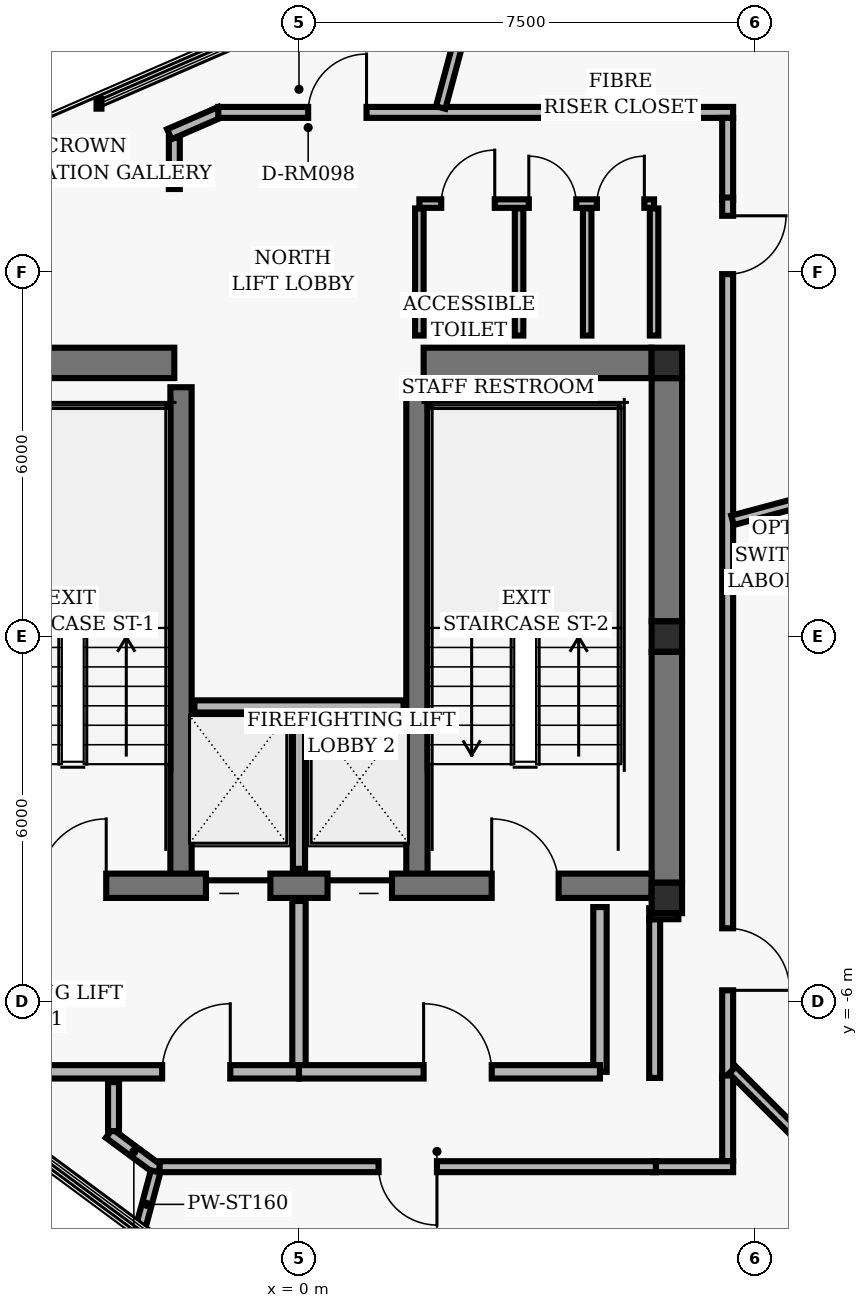
"""IFC4 building model, lengths in metres.
Left out: names, types, materials, properties, quantities, classifications, styles, units other than length and angle.
Written with IfcOpenShell. Run it as: python <this file> out.ifc"""

import sys

from ifc_helpers import new_model, si_unit, direction, frame, frame_2d, origin, origin_2d, place, context, subcontext, project, spatial, rectangle, hollow_rectangle, extrude, element, fill, save


model = new_model("IFC4")
c1 = context("Model", 3, precision=1e-05, world=origin(), true_north=direction((0.0, 1.0)))
c2 = subcontext(c1, "Body", "Model", "MODEL_VIEW")
j1 = project(units=[si_unit("LENGTHUNIT", "METRE"), si_unit("PLANEANGLEUNIT", "RADIAN")], contexts=[c1])
p1 = place(None, origin())
s1 = spatial("IfcSite", under=j1, at=p1, CompositionType="ELEMENT")
p2 = place(p1, origin())
s2 = spatial("IfcBuilding", under=s1, at=p2, CompositionType="ELEMENT")
p3 = place(p2, frame((0.0, 0.0, 246.24)))
s3 = spatial("IfcBuildingStorey", under=s2, at=p3, CompositionType="ELEMENT", Elevation=246.24)
for number, where, z_axis, x_axis in (
    (1, (6.05, 4.5, 0.0), (0.0, 0.0, 1.0), (1.0, 0.0, 0.0)),
    (2, (6.05, 0.0, 0.0), (0.0, 0.0, 1.0), (1.0, 0.0, 0.0)),
    (3, (6.05, -4.3, 0.0), (0.0, 0.0, 1.0), (1.0, 0.0, 0.0)),
):
    element("IfcColumn", number, at=place(p3, frame(where, z_axis=z_axis, x_axis=x_axis)), inside=s3, PredefinedType="COLUMN", context=c2, shape_type="SweptSolid", body=[
        extrude(hollow_rectangle(XDim=0.5, YDim=0.5, WallThickness=0.02, InnerFilletRadius=0.02, OuterFilletRadius=0.04, at=origin_2d()), origin(), (0.0, 0.0, 1.0), 2.88),
    ])
p4 = place(p3, frame((6.05, 0.25, 0.0), z_axis=(0.0, 0.0, 1.0), x_axis=(0.0, 1.0, 0.0)))
e4 = element("IfcWall", 4, at=p4, inside=s3, PredefinedType="SHEAR", context=c2, shape_type="SweptSolid", body=[
    extrude(rectangle(XDim=4.0, YDim=0.5, at=frame_2d((2.0, 0.0))), origin(), (0.0, 0.0, 1.0), 2.648),
])
p5 = place(p3, frame((6.05, -4.05, 0.0), z_axis=(0.0, 0.0, 1.0), x_axis=(0.0, 1.0, 0.0)))
e5 = element("IfcWall", 5, at=p5, inside=s3, PredefinedType="SHEAR", context=c2, shape_type="SweptSolid", body=[
    extrude(rectangle(XDim=3.8, YDim=0.5, at=frame_2d((1.9, 0.0))), origin(), (0.0, 0.0, 1.0), 2.648),
])
for number, where, z_axis, x_axis in (
    (6, (-1.94, -4.1, 0.0), (0.0, 0.0, 1.0), (0.0, 1.0, 0.0)),
    (7, (1.94, -4.1, 0.0), (0.0, 0.0, 1.0), (0.0, 1.0, 0.0)),
):
    element("IfcWall", number, at=place(p3, frame(where, z_axis=z_axis, x_axis=x_axis)), inside=s3, PredefinedType="SHEAR", context=c2, shape_type="SweptSolid", body=[
        extrude(rectangle(XDim=8.2, YDim=0.35, at=frame_2d((4.1, 0.0))), origin(), (0.0, 0.0, 1.0), 2.648),
    ])
p6 = place(p3, frame((-5.8, -4.1, 0.0), z_axis=(0.0, 0.0, 1.0), x_axis=(1.0, 0.0, 0.0)))
e8 = element("IfcWall", 8, at=p6, inside=s3, PredefinedType="SHEAR", context=c2, shape_type="SweptSolid", body=[
    extrude(rectangle(XDim=11.6, YDim=0.4, at=frame_2d((5.8, 0.0))), origin(), (0.0, 0.0, 1.0), 2.648),
])
p7 = place(p6, frame((1.53, 0.0, 0.0)))
e9 = element("IfcOpeningElement", 9, at=p7, cuts=e8, PredefinedType="OPENING", context=c2, shape_type="SweptSolid", body=[
    extrude(rectangle(XDim=1.1, YDim=2.04, at=frame_2d((0.55, 1.02))), frame((0.0, 0.21, 0.0), z_axis=(0.0, -1.0, 0.0), x_axis=(1.0, 0.0, 0.0)), (0.0, 0.0, 1.0), 0.42),
])
p8 = place(p6, frame((8.97, 0.0, 0.0)))
e10 = element("IfcOpeningElement", 10, at=p8, cuts=e8, PredefinedType="OPENING", context=c2, shape_type="SweptSolid", body=[
    extrude(rectangle(XDim=1.1, YDim=2.04, at=frame_2d((0.55, 1.02))), frame((0.0, 0.21, 0.0), z_axis=(0.0, -1.0, 0.0), x_axis=(1.0, 0.0, 0.0)), (0.0, 0.0, 1.0), 0.42),
])
p9 = place(p6, frame((4.27, 0.0, 0.0)))
e11 = element("IfcOpeningElement", 11, at=p9, cuts=e8, PredefinedType="OPENING", context=c2, shape_type="SweptSolid", body=[
    extrude(rectangle(XDim=1.06, YDim=2.04, at=frame_2d((0.53, 1.02))), frame((0.0, 0.21, 0.0), z_axis=(0.0, -1.0, 0.0), x_axis=(1.0, 0.0, 0.0)), (0.0, 0.0, 1.0), 0.42),
])
p10 = place(p6, frame((6.27, 0.0, 0.0)))
e12 = element("IfcOpeningElement", 12, at=p10, cuts=e8, PredefinedType="OPENING", context=c2, shape_type="SweptSolid", body=[
    extrude(rectangle(XDim=1.06, YDim=2.04, at=frame_2d((0.53, 1.02))), frame((0.0, 0.21, 0.0), z_axis=(0.0, -1.0, 0.0), x_axis=(1.0, 0.0, 0.0)), (0.0, 0.0, 1.0), 0.42),
])
for number, where, z_axis, x_axis in (
    (13, (-5.8, 4.5, 0.0), (0.0, 0.0, 1.0), (1.0, 0.0, 0.0)),
    (14, (2.05, 4.5, 0.0), (0.0, 0.0, 1.0), (1.0, 0.0, 0.0)),
):
    element("IfcWall", number, at=place(p3, frame(where, z_axis=z_axis, x_axis=x_axis)), inside=s3, PredefinedType="SHEAR", context=c2, shape_type="SweptSolid", body=[
        extrude(rectangle(XDim=3.75, YDim=0.5, at=frame_2d((1.875, 0.0))), origin(), (0.0, 0.0, 1.0), 2.648),
    ])
p11 = place(p3, frame((0.0, -3.82, 0.0), z_axis=(0.0, 0.0, 1.0), x_axis=(0.0, 1.0, 0.0)))
e15 = element("IfcWall", 15, at=p11, inside=s3, PredefinedType="PARTITIONING", context=c2, shape_type="SweptSolid", body=[
    extrude(rectangle(XDim=2.67, YDim=0.2, at=frame_2d((1.335, 0.0))), origin(), (0.0, 0.0, 1.0), 2.623),
])
p12 = place(p3, frame((-1.72, -1.15, 0.0), z_axis=(0.0, 0.0, 1.0), x_axis=(1.0, 0.0, 0.0)))
e16 = element("IfcWall", 16, at=p12, inside=s3, PredefinedType="PARTITIONING", context=c2, shape_type="SweptSolid", body=[
    extrude(rectangle(XDim=3.44, YDim=0.2, at=frame_2d((1.72, 0.0))), origin(), (0.0, 0.0, 1.0), 2.623),
])
p13 = place(p3, frame((4.95, -7.16, 0.0), z_axis=(0.0, 0.0, 1.0), x_axis=(0.0, 1.0, 0.0)))
e17 = element("IfcWall", 17, at=p13, inside=s3, PredefinedType="PARTITIONING", context=c2, shape_type="SweptSolid", body=[
    extrude(rectangle(XDim=2.71, YDim=0.22, at=frame_2d((1.355, 0.0))), origin(), (0.0, 0.0, 1.0), 2.623),
])
p14 = place(p3, frame((0.0, -7.16, 0.0), z_axis=(0.0, 0.0, 1.0), x_axis=(0.0, 1.0, 0.0)))
e18 = element("IfcWall", 18, at=p14, inside=s3, PredefinedType="PARTITIONING", context=c2, shape_type="SweptSolid", body=[
    extrude(rectangle(XDim=2.81, YDim=0.22, at=frame_2d((1.405, 0.0))), origin(), (0.0, 0.0, 1.0), 2.623),
])
p15 = place(p3, frame((-5.4, -7.16, 0.0), z_axis=(0.0, 0.0, 1.0), x_axis=(1.0, 0.0, 0.0)))
e19 = element("IfcWall", 19, at=p15, inside=s3, PredefinedType="PARTITIONING", context=c2, shape_type="SweptSolid", body=[
    extrude(rectangle(XDim=5.4, YDim=0.22, at=frame_2d((2.7, 0.0))), origin(), (0.0, 0.0, 1.0), 2.623),
])
p16 = place(p15, frame((3.15, 0.0, 0.0)))
e20 = element("IfcOpeningElement", 20, at=p16, cuts=e19, PredefinedType="OPENING", context=c2, shape_type="SweptSolid", body=[
    extrude(rectangle(XDim=1.12, YDim=2.02, at=frame_2d((0.56, 1.01))), frame((0.0, 0.12, 0.0), z_axis=(0.0, -1.0, 0.0), x_axis=(1.0, 0.0, 0.0)), (0.0, 0.0, 1.0), 0.24),
])
p17 = place(p3, frame((0.0, -7.16, 0.0), z_axis=(0.0, 0.0, 1.0), x_axis=(1.0, 0.0, 0.0)))
e21 = element("IfcWall", 21, at=p17, inside=s3, PredefinedType="PARTITIONING", context=c2, shape_type="SweptSolid", body=[
    extrude(rectangle(XDim=4.95, YDim=0.22, at=frame_2d((2.475, 0.0))), origin(), (0.0, 0.0, 1.0), 2.623),
])
p18 = place(p17, frame((2.05, 0.0, 0.0)))
e22 = element("IfcOpeningElement", 22, at=p18, cuts=e21, PredefinedType="OPENING", context=c2, shape_type="SweptSolid", body=[
    extrude(rectangle(XDim=1.12, YDim=2.02, at=frame_2d((0.56, 1.01))), frame((0.0, 0.12, 0.0), z_axis=(0.0, -1.0, 0.0), x_axis=(1.0, 0.0, 0.0)), (0.0, 0.0, 1.0), 0.24),
])
p19 = place(p3, frame((1.98, 4.95, 0.0), z_axis=(0.0, 0.0, 1.0), x_axis=(0.0, 1.0, 0.0)))
e23 = element("IfcWall", 23, at=p19, inside=s3, PredefinedType="PARTITIONING", context=c2, shape_type="SweptSolid", body=[
    extrude(rectangle(XDim=2.09, YDim=0.14, at=frame_2d((1.045, 0.0))), origin(), (0.0, 0.0, 1.0), 2.623),
])
p20 = place(p3, frame((5.84, 4.95, 0.0), z_axis=(0.0, 0.0, 1.0), x_axis=(0.0, 1.0, 0.0)))
e24 = element("IfcWall", 24, at=p20, inside=s3, PredefinedType="PARTITIONING", context=c2, shape_type="SweptSolid", body=[
    extrude(rectangle(XDim=2.09, YDim=0.14, at=frame_2d((1.045, 0.0))), origin(), (0.0, 0.0, 1.0), 2.153),
])
p21 = place(p3, frame((1.98, 7.12, 0.0), z_axis=(0.0, 0.0, 1.0), x_axis=(1.0, 0.0, 0.0)))
e25 = element("IfcWall", 25, at=p21, inside=s3, PredefinedType="PARTITIONING", context=c2, shape_type="SweptSolid", body=[
    extrude(rectangle(XDim=3.86, YDim=0.14, at=frame_2d((1.93, 0.0))), origin(), (0.0, 0.0, 1.0), 2.623),
])
p22 = place(p21, frame((0.36, 0.0, 0.0)))
e26 = element("IfcOpeningElement", 26, at=p22, cuts=e25, PredefinedType="OPENING", context=c2, shape_type="SweptSolid", body=[
    extrude(rectangle(XDim=0.88, YDim=2.02, at=frame_2d((0.44, 1.01))), frame((0.0, 0.08, 0.0), z_axis=(0.0, -1.0, 0.0), x_axis=(1.0, 0.0, 0.0)), (0.0, 0.0, 1.0), 0.16),
])
p23 = place(p21, frame((1.8, 0.0, 0.0)))
e27 = element("IfcOpeningElement", 27, at=p23, cuts=e25, PredefinedType="OPENING", context=c2, shape_type="SweptSolid", body=[
    extrude(rectangle(XDim=0.78, YDim=2.01, at=frame_2d((0.39, 1.005))), frame((0.0, 0.08, 0.0), z_axis=(0.0, -1.0, 0.0), x_axis=(1.0, 0.0, 0.0)), (0.0, 0.0, 1.0), 0.16),
])
p24 = place(p21, frame((2.92, 0.0, 0.0)))
e28 = element("IfcOpeningElement", 28, at=p24, cuts=e25, PredefinedType="OPENING", context=c2, shape_type="SweptSolid", body=[
    extrude(rectangle(XDim=0.78, YDim=2.01, at=frame_2d((0.39, 1.005))), frame((0.0, 0.08, 0.0), z_axis=(0.0, -1.0, 0.0), x_axis=(1.0, 0.0, 0.0)), (0.0, 0.0, 1.0), 0.16),
])
for number, where, z_axis, x_axis in (
    (29, (3.62, 4.95, 0.0), (0.0, 0.0, 1.0), (0.0, 1.0, 0.0)),
    (30, (4.74, 4.95, 0.0), (0.0, 0.0, 1.0), (0.0, 1.0, 0.0)),
):
    element("IfcWall", number, at=place(p3, frame(where, z_axis=z_axis, x_axis=x_axis)), inside=s3, PredefinedType="PARTITIONING", context=c2, shape_type="SweptSolid", body=[
        extrude(rectangle(XDim=2.09, YDim=0.14, at=frame_2d((1.045, 0.0))), origin(), (0.0, 0.0, 1.0), 2.623),
    ])
p25 = place(p3, frame((-2.309, -8.773, 0.0), z_axis=(0.0, 0.0, 1.0), x_axis=(-0.803864984235, 0.594811808155, 0.0)))
e31 = element("IfcWall", 31, at=p25, inside=s3, PredefinedType="PARTITIONING", context=c2, shape_type="SweptSolid", body=[
    extrude(rectangle(XDim=1.011, YDim=0.18, at=frame_2d((0.506, 0.0))), origin(), (0.0, 0.0, 1.0), 2.203),
])
p26 = place(p3, frame((-3.05, -8.135, 0.0), z_axis=(0.0, 0.0, 1.0), x_axis=(0.0, 1.0, 0.0)))
e32 = element("IfcWall", 32, at=p26, inside=s3, PredefinedType="PARTITIONING", context=c2, shape_type="SweptSolid", body=[
    extrude(rectangle(XDim=0.805, YDim=0.18, at=frame_2d((0.403, 0.0))), origin(), (0.0, 0.0, 1.0), 2.623),
])
p27 = place(p3, frame((5.85, -7.26, 0.0), z_axis=(0.0, 0.0, 1.0), x_axis=(0.0, 1.0, 0.0)))
e33 = element("IfcWall", 33, at=p27, inside=s3, PredefinedType="PARTITIONING", context=c2, shape_type="SweptSolid", body=[
    extrude(rectangle(XDim=2.61, YDim=0.18, at=frame_2d((1.305, 0.0))), origin(), (0.0, 0.0, 1.0), 2.153),
])
p28 = place(p3, frame((5.76, -4.56, 0.0), z_axis=(0.0, 0.0, 1.0), x_axis=(1.0, 0.0, 0.0)))
e34 = element("IfcWall", 34, at=p28, inside=s3, PredefinedType="PARTITIONING", context=c2, shape_type="SweptSolid", body=[
    extrude(rectangle(XDim=0.48, YDim=0.18, at=frame_2d((0.24, 0.0))), origin(), (0.0, 0.0, 1.0), 2.623),
])
p29 = place(p3, frame((-2.05, 7.36, 0.0), z_axis=(0.0, 0.0, 1.0), x_axis=(0.0, 1.0, 0.0)))
e35 = element("IfcWall", 35, at=p29, inside=s3, PredefinedType="PARTITIONING", context=c2, shape_type="SweptSolid", body=[
    extrude(rectangle(XDim=0.847, YDim=0.18, at=frame_2d((0.423, 0.0))), origin(), (0.0, 0.0, 1.0), 2.623),
])
p30 = place(p3, frame((-2.133, 8.261, 0.0), z_axis=(0.0, 0.0, 1.0), x_axis=(0.917032085412, 0.398813432979, 0.0)))
e36 = element("IfcWall", 36, at=p30, inside=s3, PredefinedType="PARTITIONING", context=c2, shape_type="SweptSolid", body=[
    extrude(rectangle(XDim=0.92, YDim=0.18, at=frame_2d((0.46, 0.0))), origin(), (0.0, 0.0, 1.0), 2.203),
])
p31 = place(p3, frame((-1.327, 8.62, 0.0), z_axis=(0.0, 0.0, 1.0), x_axis=(1.0, 0.0, 0.0)))
e37 = element("IfcWall", 37, at=p31, inside=s3, PredefinedType="PARTITIONING", context=c2, shape_type="SweptSolid", body=[
    extrude(rectangle(XDim=7.197, YDim=0.18, at=frame_2d((3.599, 0.0))), origin(), (0.0, 0.0, 1.0), 2.623),
])
p32 = place(p31, frame((1.478, 0.0, 0.0)))
e38 = element("IfcOpeningElement", 38, at=p32, cuts=e37, PredefinedType="OPENING", context=c2, shape_type="SweptSolid", body=[
    extrude(rectangle(XDim=0.96, YDim=2.02, at=frame_2d((0.48, 1.01))), frame((0.0, 0.1, 0.0), z_axis=(0.0, -1.0, 0.0), x_axis=(1.0, 0.0, 0.0)), (0.0, 0.0, 1.0), 0.2),
])
p33 = place(p3, frame((5.83, 8.62, 0.0), z_axis=(0.0, 0.0, 1.0), x_axis=(1.0, 0.0, 0.0)))
e39 = element("IfcWall", 39, at=p33, inside=s3, PredefinedType="PARTITIONING", context=c2, shape_type="SweptSolid", body=[
    extrude(rectangle(XDim=1.31, YDim=0.18, at=frame_2d((0.655, 0.0))), origin(), (0.0, 0.0, 1.0), 2.623),
])
p34 = place(p3, frame((7.05, 8.53, 0.0), z_axis=(0.0, 0.0, 1.0), x_axis=(0.0, -1.0, 0.0)))
e40 = element("IfcWall", 40, at=p34, inside=s3, PredefinedType="PARTITIONING", context=c2, shape_type="SweptSolid", body=[
    extrude(rectangle(XDim=1.35, YDim=0.18, at=frame_2d((0.675, 0.0))), origin(), (0.0, 0.0, 1.0), 2.623),
])
p35 = place(p3, frame((7.05, 7.22, 0.0), z_axis=(0.0, 0.0, 1.0), x_axis=(0.0, -1.0, 0.0)))
e41 = element("IfcWall", 41, at=p35, inside=s3, PredefinedType="PARTITIONING", context=c2, shape_type="SweptSolid", body=[
    extrude(rectangle(XDim=14.48, YDim=0.18, at=frame_2d((7.24, 0.0))), origin(), (0.0, 0.0, 1.0), 2.203),
])
p36 = place(p35, frame((12.019, 0.0, 0.0)))
e42 = element("IfcOpeningElement", 42, at=p36, cuts=e41, PredefinedType="OPENING", context=c2, shape_type="SweptSolid", body=[
    extrude(rectangle(XDim=1.02, YDim=2.02, at=frame_2d((0.51, 1.01))), frame((0.0, 0.1, 0.0), z_axis=(0.0, -1.0, 0.0), x_axis=(1.0, 0.0, 0.0)), (0.0, 0.0, 1.0), 0.2),
])
p37 = place(p35, frame((0.3, 0.0, 0.0)))
e43 = element("IfcOpeningElement", 43, at=p37, cuts=e41, PredefinedType="OPENING", context=c2, shape_type="SweptSolid", body=[
    extrude(rectangle(XDim=0.96, YDim=2.02, at=frame_2d((0.48, 1.01))), frame((0.0, 0.1, 0.0), z_axis=(0.0, -1.0, 0.0), x_axis=(1.0, 0.0, 0.0)), (0.0, 0.0, 1.0), 0.2),
])
p38 = place(p3, frame((7.05, -7.22, 0.0), z_axis=(0.0, 0.0, 1.0), x_axis=(0.0, -1.0, 0.0)))
e44 = element("IfcWall", 44, at=p38, inside=s3, PredefinedType="PARTITIONING", context=c2, shape_type="SweptSolid", body=[
    extrude(rectangle(XDim=1.41, YDim=0.18, at=frame_2d((0.705, 0.0))), origin(), (0.0, 0.0, 1.0), 2.153),
])
p39 = place(p3, frame((7.14, -8.72, 0.0), z_axis=(0.0, 0.0, 1.0), x_axis=(-1.0, 0.0, 0.0)))
e45 = element("IfcWall", 45, at=p39, inside=s3, PredefinedType="PARTITIONING", context=c2, shape_type="SweptSolid", body=[
    extrude(rectangle(XDim=1.31, YDim=0.18, at=frame_2d((0.655, 0.0))), origin(), (0.0, 0.0, 1.0), 2.623),
])
p40 = place(p3, frame((5.87, -8.72, 0.0), z_axis=(0.0, 0.0, 1.0), x_axis=(-1.0, 0.0, 0.0)))
e46 = element("IfcWall", 46, at=p40, inside=s3, PredefinedType="PARTITIONING", context=c2, shape_type="SweptSolid", body=[
    extrude(rectangle(XDim=8.162, YDim=0.18, at=frame_2d((4.081, 0.0))), origin(), (0.0, 0.0, 1.0), 2.623),
])
p41 = place(p40, frame((3.601, 0.0, 0.0)))
e47 = element("IfcOpeningElement", 47, at=p41, cuts=e46, PredefinedType="OPENING", context=c2, shape_type="SweptSolid", body=[
    extrude(rectangle(XDim=0.96, YDim=2.02, at=frame_2d((0.48, 1.01))), frame((0.0, 0.1, 0.0), z_axis=(0.0, -1.0, 0.0), x_axis=(1.0, 0.0, 0.0)), (0.0, 0.0, 1.0), 0.2),
])
p42 = place(p3, frame((-2.358, -8.8, 0.0), z_axis=(0.0, 0.0, 1.0), x_axis=(-0.258899893442, -0.965904159415, 0.0)))
e48 = element("IfcWall", 48, at=p42, inside=s3, PredefinedType="PARTITIONING", context=c2, shape_type="SweptSolid", body=[
    extrude(rectangle(XDim=1.117, YDim=0.16, at=frame_2d((0.559, 0.0))), origin(), (0.0, 0.0, 1.0), 2.623),
])
p43 = place(p3, frame((7.13, -7.13, 0.0), z_axis=(0.0, 0.0, 1.0), x_axis=(0.707106781187, -0.707106781187, 0.0)))
e49 = element("IfcWall", 49, at=p43, inside=s3, PredefinedType="PARTITIONING", context=c2, shape_type="SweptSolid", body=[
    extrude(rectangle(XDim=2.076, YDim=0.16, at=frame_2d((1.038, 0.0))), origin(), (0.0, 0.0, 1.0), 2.623),
])
p44 = place(p3, frame((7.13, 1.91, 0.0), z_axis=(0.0, 0.0, 1.0), x_axis=(0.965918188347, 0.258847548609, 0.0)))
e50 = element("IfcWall", 50, at=p44, inside=s3, PredefinedType="PARTITIONING", context=c2, shape_type="SweptSolid", body=[
    extrude(rectangle(XDim=2.846, YDim=0.16, at=frame_2d((1.423, 0.0))), origin(), (0.0, 0.0, 1.0), 2.623),
])
p45 = place(p3, frame((2.331, 8.7, 0.0), z_axis=(0.0, 0.0, 1.0), x_axis=(0.258790273714, 0.9659335351, 0.0)))
e51 = element("IfcWall", 51, at=p45, inside=s3, PredefinedType="PARTITIONING", context=c2, shape_type="SweptSolid", body=[
    extrude(rectangle(XDim=3.153, YDim=0.16, at=frame_2d((1.576, 0.0))), origin(), (0.0, 0.0, 1.0), 2.623),
])
p46 = place(p7, origin())
e52 = element("IfcDoor", 52, at=p46, inside=s3, OperationType="SINGLE_SWING_RIGHT", PredefinedType="DOOR", context=c2, shape_type="SweptSolid", body=[
    extrude(rectangle(XDim=1.1, YDim=2.04, at=frame_2d((0.55, 1.02))), frame((0.0, 0.025, 0.0), z_axis=(0.0, -1.0, 0.0), x_axis=(1.0, 0.0, 0.0)), (0.0, 0.0, 1.0), 0.05),
])
fill(e9, e52)
p47 = place(p8, origin())
e53 = element("IfcDoor", 53, at=p47, inside=s3, OperationType="SINGLE_SWING_LEFT", PredefinedType="DOOR", context=c2, shape_type="SweptSolid", body=[
    extrude(rectangle(XDim=1.1, YDim=2.04, at=frame_2d((0.55, 1.02))), frame((0.0, 0.025, 0.0), z_axis=(0.0, -1.0, 0.0), x_axis=(1.0, 0.0, 0.0)), (0.0, 0.0, 1.0), 0.05),
])
fill(e10, e53)
p48 = place(p9, origin())
e54 = element("IfcDoor", 54, at=p48, inside=s3, OperationType="SLIDING_TO_LEFT", PredefinedType="DOOR", context=c2, shape_type="SweptSolid", body=[
    extrude(rectangle(XDim=1.06, YDim=2.04, at=frame_2d((0.53, 1.02))), frame((0.0, 0.025, 0.0), z_axis=(0.0, -1.0, 0.0), x_axis=(1.0, 0.0, 0.0)), (0.0, 0.0, 1.0), 0.05),
])
fill(e11, e54)
p49 = place(p10, origin())
e55 = element("IfcDoor", 55, at=p49, inside=s3, OperationType="SLIDING_TO_RIGHT", PredefinedType="DOOR", context=c2, shape_type="SweptSolid", body=[
    extrude(rectangle(XDim=1.06, YDim=2.04, at=frame_2d((0.53, 1.02))), frame((0.0, 0.025, 0.0), z_axis=(0.0, -1.0, 0.0), x_axis=(1.0, 0.0, 0.0)), (0.0, 0.0, 1.0), 0.05),
])
fill(e12, e55)
p50 = place(p16, origin())
e56 = element("IfcDoor", 56, at=p50, inside=s3, OperationType="SINGLE_SWING_RIGHT", PredefinedType="DOOR", context=c2, shape_type="SweptSolid", body=[
    extrude(rectangle(XDim=1.12, YDim=2.02, at=frame_2d((0.56, 1.01))), frame((0.0, 0.025, 0.0), z_axis=(0.0, -1.0, 0.0), x_axis=(1.0, 0.0, 0.0)), (0.0, 0.0, 1.0), 0.05),
])
fill(e20, e56)
p51 = place(p18, origin())
e57 = element("IfcDoor", 57, at=p51, inside=s3, OperationType="SINGLE_SWING_LEFT", PredefinedType="DOOR", context=c2, shape_type="SweptSolid", body=[
    extrude(rectangle(XDim=1.12, YDim=2.02, at=frame_2d((0.56, 1.01))), frame((0.0, 0.025, 0.0), z_axis=(0.0, -1.0, 0.0), x_axis=(1.0, 0.0, 0.0)), (0.0, 0.0, 1.0), 0.05),
])
fill(e22, e57)
p52 = place(p22, origin())
e58 = element("IfcDoor", 58, at=p52, inside=s3, OperationType="SINGLE_SWING_RIGHT", PredefinedType="DOOR", context=c2, shape_type="SweptSolid", body=[
    extrude(rectangle(XDim=0.88, YDim=2.02, at=frame_2d((0.44, 1.01))), frame((0.0, 0.025, 0.0), z_axis=(0.0, -1.0, 0.0), x_axis=(1.0, 0.0, 0.0)), (0.0, 0.0, 1.0), 0.05),
])
fill(e26, e58)
p53 = place(p23, origin())
e59 = element("IfcDoor", 59, at=p53, inside=s3, OperationType="SINGLE_SWING_LEFT", PredefinedType="DOOR", context=c2, shape_type="SweptSolid", body=[
    extrude(rectangle(XDim=0.78, YDim=2.01, at=frame_2d((0.39, 1.005))), frame((0.0, 0.025, 0.0), z_axis=(0.0, -1.0, 0.0), x_axis=(1.0, 0.0, 0.0)), (0.0, 0.0, 1.0), 0.05),
])
fill(e27, e59)
p54 = place(p24, origin())
e60 = element("IfcDoor", 60, at=p54, inside=s3, OperationType="SINGLE_SWING_RIGHT", PredefinedType="DOOR", context=c2, shape_type="SweptSolid", body=[
    extrude(rectangle(XDim=0.78, YDim=2.01, at=frame_2d((0.39, 1.005))), frame((0.0, 0.025, 0.0), z_axis=(0.0, -1.0, 0.0), x_axis=(1.0, 0.0, 0.0)), (0.0, 0.0, 1.0), 0.05),
])
fill(e28, e60)
p55 = place(p41, origin())
e61 = element("IfcDoor", 61, at=p55, inside=s3, OperationType="SINGLE_SWING_LEFT", PredefinedType="DOOR", context=c2, shape_type="SweptSolid", body=[
    extrude(rectangle(XDim=0.96, YDim=2.02, at=frame_2d((0.48, 1.01))), frame((0.0, 0.025, 0.0), z_axis=(0.0, -1.0, 0.0), x_axis=(1.0, 0.0, 0.0)), (0.0, 0.0, 1.0), 0.05),
])
fill(e47, e61)
p56 = place(p36, origin())
e62 = element("IfcDoor", 62, at=p56, inside=s3, OperationType="SINGLE_SWING_RIGHT", PredefinedType="DOOR", context=c2, shape_type="SweptSolid", body=[
    extrude(rectangle(XDim=1.02, YDim=2.02, at=frame_2d((0.51, 1.01))), frame((0.0, 0.025, 0.0), z_axis=(0.0, -1.0, 0.0), x_axis=(1.0, 0.0, 0.0)), (0.0, 0.0, 1.0), 0.05),
])
fill(e42, e62)
p57 = place(p37, origin())
e63 = element("IfcDoor", 63, at=p57, inside=s3, OperationType="SINGLE_SWING_LEFT", PredefinedType="DOOR", context=c2, shape_type="SweptSolid", body=[
    extrude(rectangle(XDim=0.96, YDim=2.02, at=frame_2d((0.48, 1.01))), frame((0.0, 0.025, 0.0), z_axis=(0.0, -1.0, 0.0), x_axis=(1.0, 0.0, 0.0)), (0.0, 0.0, 1.0), 0.05),
])
fill(e43, e63)
p58 = place(p32, origin())
e64 = element("IfcDoor", 64, at=p58, inside=s3, OperationType="SINGLE_SWING_RIGHT", PredefinedType="DOOR", context=c2, shape_type="SweptSolid", body=[
    extrude(rectangle(XDim=0.96, YDim=2.02, at=frame_2d((0.48, 1.01))), frame((0.0, 0.025, 0.0), z_axis=(0.0, -1.0, 0.0), x_axis=(1.0, 0.0, 0.0)), (0.0, 0.0, 1.0), 0.05),
])
fill(e38, e64)
save(model, sys.argv[1])
